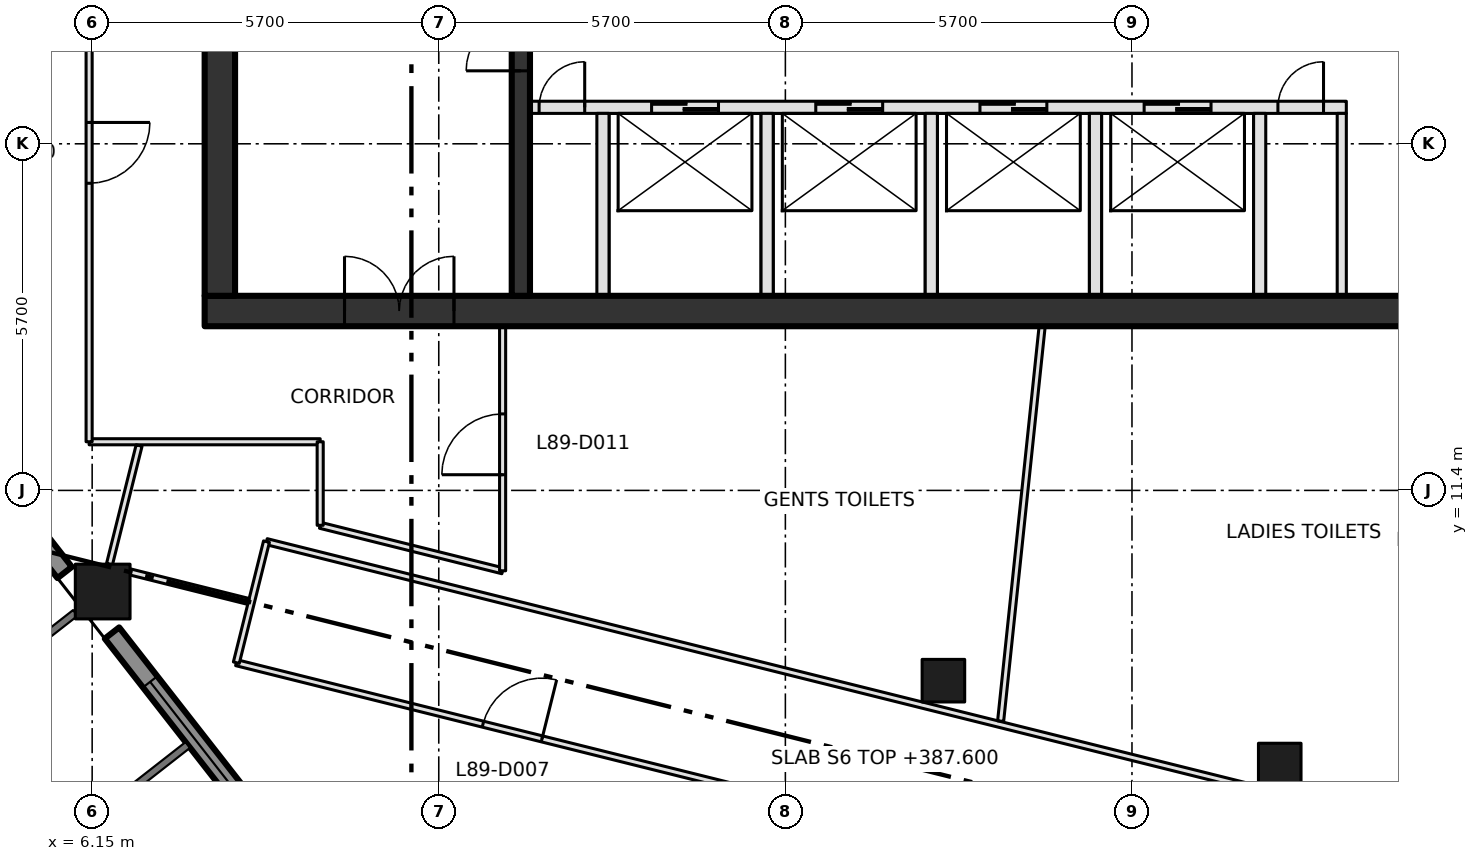
"""IFC4 building model, lengths in metres.
Left out: names, types, materials, properties, quantities, classifications, styles, units other than length and angle.
Written with IfcOpenShell. Run it as: python <this file> out.ifc"""

import sys

from ifc_helpers import new_model, si_unit, direction, frame, frame_2d, origin, origin_2d, place, context, subcontext, project, spatial, rectangle, extrude, element, fill, save


model = new_model("IFC4")
c1 = context("Model", 3, precision=1e-05, world=origin(), true_north=direction((0.0, 1.0)))
c2 = subcontext(c1, "Body", "Model", "MODEL_VIEW")
j1 = project(units=[si_unit("LENGTHUNIT", "METRE"), si_unit("PLANEANGLEUNIT", "RADIAN")], contexts=[c1])
p1 = place(None, origin())
s1 = spatial("IfcSite", under=j1, at=p1, CompositionType="ELEMENT")
p2 = place(p1, origin())
s2 = spatial("IfcBuilding", under=s1, at=p2, CompositionType="ELEMENT")
p3 = place(p2, frame((0.0, 0.0, 387.6)))
s3 = spatial("IfcBuildingStorey", under=s2, at=p3, CompositionType="ELEMENT", Elevation=387.6)
p4 = place(p3, frame((6.323, 9.737, 0.0), z_axis=(0.0, 0.0, 1.0), x_axis=(1.0, 0.0, 0.0)))
e1 = element("IfcColumn", 1, at=p4, inside=s3, PredefinedType="COLUMN", context=c2, shape_type="SweptSolid", body=[
    extrude(rectangle(XDim=0.9, YDim=0.9, at=origin_2d()), origin(), (0.0, 0.0, 1.0), 4.2),
])
for number, where, z_axis, x_axis in (
    (2, (20.149, 8.271, 0.0), (0.0, 0.0, 1.0), (1.0, 0.0, 0.0)),
    (3, (25.68, 6.892, 0.0), (0.0, 0.0, 1.0), (1.0, 0.0, 0.0)),
):
    element("IfcColumn", number, at=place(p3, frame(where, z_axis=z_axis, x_axis=x_axis)), inside=s3, PredefinedType="COLUMN", context=c2, shape_type="SweptSolid", body=[
        extrude(rectangle(XDim=0.7, YDim=0.7, at=origin_2d()), origin(), (0.0, 0.0, 1.0), 4.2),
    ])
p5 = place(p3, frame((8.0, 14.35, -0.3), z_axis=(0.0, 0.0, 1.0), x_axis=(1.0, 0.0, 0.0)))
e4 = element("IfcWall", 4, at=p5, inside=s3, PredefinedType="SHEAR", context=c2, shape_type="SweptSolid", body=[
    extrude(rectangle(XDim=22.8, YDim=0.5, at=frame_2d((11.4, 0.0))), origin(), (0.0, 0.0, 1.0), 4.2),
])
p6 = place(p5, frame((2.3, 0.0, 0.3)))
e5 = element("IfcOpeningElement", 5, at=p6, cuts=e4, PredefinedType="OPENING", context=c2, shape_type="SweptSolid", body=[
    extrude(rectangle(XDim=1.8, YDim=2.1, at=frame_2d((0.9, 1.05))), frame((0.0, 0.26, 0.0), z_axis=(0.0, -1.0, 0.0), x_axis=(1.0, 0.0, 0.0)), (0.0, 0.0, 1.0), 0.52),
])
p7 = place(p3, frame((8.25, 14.6, -0.3), z_axis=(0.0, 0.0, 1.0), x_axis=(0.0, 1.0, 0.0)))
e6 = element("IfcWall", 6, at=p7, inside=s3, PredefinedType="SHEAR", context=c2, shape_type="SweptSolid", body=[
    extrude(rectangle(XDim=21.1, YDim=0.5, at=frame_2d((10.55, 0.0))), origin(), (0.0, 0.0, 1.0), 4.2),
])
p8 = place(p3, frame((13.35, 17.7, 0.0), z_axis=(0.0, 0.0, 1.0), x_axis=(1.0, 0.0, 0.0)))
e7 = element("IfcWall", 7, at=p8, inside=s3, PredefinedType="SOLIDWALL", context=c2, shape_type="SweptSolid", body=[
    extrude(rectangle(XDim=13.425, YDim=0.2, at=frame_2d((6.712, 0.0))), origin(), (0.0, 0.0, 1.0), 3.9),
])
p9 = place(p8, frame((2.0, 0.0, 0.0)))
e8 = element("IfcOpeningElement", 8, at=p9, cuts=e7, PredefinedType="OPENING", context=c2, shape_type="SweptSolid", body=[
    extrude(rectangle(XDim=1.1, YDim=2.1, at=frame_2d((0.55, 1.05))), frame((0.0, 0.11, 0.0), z_axis=(0.0, -1.0, 0.0), x_axis=(1.0, 0.0, 0.0)), (0.0, 0.0, 1.0), 0.22),
])
p10 = place(p8, frame((4.7, 0.0, 0.0)))
e9 = element("IfcOpeningElement", 9, at=p10, cuts=e7, PredefinedType="OPENING", context=c2, shape_type="SweptSolid", body=[
    extrude(rectangle(XDim=1.1, YDim=2.1, at=frame_2d((0.55, 1.05))), frame((0.0, 0.11, 0.0), z_axis=(0.0, -1.0, 0.0), x_axis=(1.0, 0.0, 0.0)), (0.0, 0.0, 1.0), 0.22),
])
p11 = place(p8, frame((7.4, 0.0, 0.0)))
e10 = element("IfcOpeningElement", 10, at=p11, cuts=e7, PredefinedType="OPENING", context=c2, shape_type="SweptSolid", body=[
    extrude(rectangle(XDim=1.1, YDim=2.1, at=frame_2d((0.55, 1.05))), frame((0.0, 0.11, 0.0), z_axis=(0.0, -1.0, 0.0), x_axis=(1.0, 0.0, 0.0)), (0.0, 0.0, 1.0), 0.22),
])
p12 = place(p8, frame((10.1, 0.0, 0.0)))
e11 = element("IfcOpeningElement", 11, at=p12, cuts=e7, PredefinedType="OPENING", context=c2, shape_type="SweptSolid", body=[
    extrude(rectangle(XDim=1.1, YDim=2.1, at=frame_2d((0.55, 1.05))), frame((0.0, 0.11, 0.0), z_axis=(0.0, -1.0, 0.0), x_axis=(1.0, 0.0, 0.0)), (0.0, 0.0, 1.0), 0.22),
])
p13 = place(p8, frame((0.15, 0.0, 0.0)))
e12 = element("IfcOpeningElement", 12, at=p13, cuts=e7, PredefinedType="OPENING", context=c2, shape_type="SweptSolid", body=[
    extrude(rectangle(XDim=0.75, YDim=2.1, at=frame_2d((0.375, 1.05))), frame((0.0, 0.11, 0.0), z_axis=(0.0, -1.0, 0.0), x_axis=(1.0, 0.0, 0.0)), (0.0, 0.0, 1.0), 0.22),
])
p14 = place(p8, frame((12.3, 0.0, 0.0)))
e13 = element("IfcOpeningElement", 13, at=p14, cuts=e7, PredefinedType="OPENING", context=c2, shape_type="SweptSolid", body=[
    extrude(rectangle(XDim=0.75, YDim=2.1, at=frame_2d((0.375, 1.05))), frame((0.0, 0.11, 0.0), z_axis=(0.0, -1.0, 0.0), x_axis=(1.0, 0.0, 0.0)), (0.0, 0.0, 1.0), 0.22),
])
p15 = place(p3, frame((13.2, 14.6, 0.0), z_axis=(0.0, 0.0, 1.0), x_axis=(0.0, 1.0, 0.0)))
e14 = element("IfcWall", 14, at=p15, inside=s3, PredefinedType="SHEAR", context=c2, shape_type="SweptSolid", body=[
    extrude(rectangle(XDim=21.1, YDim=0.3, at=frame_2d((10.55, 0.0))), origin(), (0.0, 0.0, 1.0), 3.9),
])
p16 = place(p15, frame((3.7, 0.0, 0.0)))
e15 = element("IfcOpeningElement", 15, at=p16, cuts=e14, PredefinedType="OPENING", context=c2, shape_type="SweptSolid", body=[
    extrude(rectangle(XDim=1.8, YDim=2.1, at=frame_2d((0.9, 1.05))), frame((0.0, 0.16, 0.0), z_axis=(0.0, -1.0, 0.0), x_axis=(1.0, 0.0, 0.0)), (0.0, 0.0, 1.0), 0.32),
])
p17 = place(p15, frame((11.8, 0.0, 0.0)))
e16 = element("IfcOpeningElement", 16, at=p17, cuts=e14, PredefinedType="OPENING", context=c2, shape_type="SweptSolid", body=[
    extrude(rectangle(XDim=1.2, YDim=2.1, at=frame_2d((0.6, 1.05))), frame((0.0, 0.16, 0.0), z_axis=(0.0, -1.0, 0.0), x_axis=(1.0, 0.0, 0.0)), (0.0, 0.0, 1.0), 0.32),
])
for number, where, z_axis, x_axis in (
    (17, (14.55, 14.6, 0.0), (0.0, 0.0, 1.0), (0.0, 1.0, 0.0)),
    (18, (17.25, 14.6, 0.0), (0.0, 0.0, 1.0), (0.0, 1.0, 0.0)),
    (19, (19.95, 14.6, 0.0), (0.0, 0.0, 1.0), (0.0, 1.0, 0.0)),
    (20, (22.65, 14.6, 0.0), (0.0, 0.0, 1.0), (0.0, 1.0, 0.0)),
    (21, (25.35, 14.6, 0.0), (0.0, 0.0, 1.0), (0.0, 1.0, 0.0)),
):
    element("IfcWall", number, at=place(p3, frame(where, z_axis=z_axis, x_axis=x_axis)), inside=s3, PredefinedType="SOLIDWALL", context=c2, shape_type="SweptSolid", body=[
        extrude(rectangle(XDim=3.0, YDim=0.2, at=frame_2d((1.5, 0.0))), origin(), (0.0, 0.0, 1.0), 3.9),
    ])
p18 = place(p3, frame((26.7, 14.6, 0.0), z_axis=(0.0, 0.0, 1.0), x_axis=(0.0, 1.0, 0.0)))
e22 = element("IfcWall", 22, at=p18, inside=s3, PredefinedType="PARTITIONING", context=c2, shape_type="SweptSolid", body=[
    extrude(rectangle(XDim=3.0, YDim=0.15, at=frame_2d((1.5, 0.0))), origin(), (0.0, 0.0, 1.0), 3.9),
])
p19 = place(p3, frame((2.967, 13.547, 0.0), z_axis=(0.0, 0.0, 1.0), x_axis=(0.615486001463, -0.788147817356, 0.0)))
e23 = element("IfcWall", 23, at=p19, inside=s3, PredefinedType="SOLIDWALL", context=c2, shape_type="SweptSolid", body=[
    extrude(rectangle(XDim=4.437, YDim=0.3, at=frame_2d((2.219, 0.0))), origin(), (0.0, 0.0, 1.0), 3.2),
])
p20 = place(p19, frame((1.018, 0.0, 0.8)))
e24 = element("IfcOpeningElement", 24, at=p20, cuts=e23, PredefinedType="OPENING", context=c2, shape_type="SweptSolid", body=[
    extrude(rectangle(XDim=2.4, YDim=2.1, at=frame_2d((1.2, 1.05))), frame((0.0, 0.16, 0.0), z_axis=(0.0, -1.0, 0.0), x_axis=(1.0, 0.0, 0.0)), (0.0, 0.0, 1.0), 0.32),
])
p21 = place(p3, frame((6.476, 9.055, 0.0), z_axis=(0.0, 0.0, 1.0), x_axis=(0.615649380255, -0.788020203162, 0.0)))
e25 = element("IfcWall", 25, at=p21, inside=s3, PredefinedType="SOLIDWALL", context=c2, shape_type="SweptSolid", body=[
    extrude(rectangle(XDim=4.438, YDim=0.3, at=frame_2d((2.219, 0.0))), origin(), (0.0, 0.0, 1.0), 3.2),
])
p22 = place(p21, frame((1.019, 0.0, 0.8)))
e26 = element("IfcOpeningElement", 26, at=p22, cuts=e25, PredefinedType="OPENING", context=c2, shape_type="SweptSolid", body=[
    extrude(rectangle(XDim=2.4, YDim=2.1, at=frame_2d((1.2, 1.05))), frame((0.0, 0.16, 0.0), z_axis=(0.0, -1.0, 0.0), x_axis=(1.0, 0.0, 0.0)), (0.0, 0.0, 1.0), 0.32),
])
p23 = place(p3, frame((6.1, 12.2, 0.0), z_axis=(0.0, 0.0, 1.0), x_axis=(1.0, 0.0, 0.0)))
e27 = element("IfcWall", 27, at=p23, inside=s3, PredefinedType="PARTITIONING", context=c2, shape_type="SweptSolid", body=[
    extrude(rectangle(XDim=3.8, YDim=0.1, at=frame_2d((1.9, 0.0))), origin(), (0.0, 0.0, 1.0), 3.9),
])
p24 = place(p3, frame((6.1, 38.9, 0.0), z_axis=(0.0, 0.0, 1.0), x_axis=(0.0, -1.0, 0.0)))
e28 = element("IfcWall", 28, at=p24, inside=s3, PredefinedType="PARTITIONING", context=c2, shape_type="SweptSolid", body=[
    extrude(rectangle(XDim=26.7, YDim=0.1, at=frame_2d((13.35, 0.0))), origin(), (0.0, 0.0, 1.0), 3.9),
])
p25 = place(p24, frame((21.449, 0.0, 0.0)))
e29 = element("IfcOpeningElement", 29, at=p25, cuts=e28, PredefinedType="OPENING", context=c2, shape_type="SweptSolid", body=[
    extrude(rectangle(XDim=1.0, YDim=2.1, at=frame_2d((0.5, 1.05))), frame((0.0, 0.06, 0.0), z_axis=(0.0, -1.0, 0.0), x_axis=(1.0, 0.0, 0.0)), (0.0, 0.0, 1.0), 0.12),
])
p26 = place(p24, frame((13.049, 0.0, 0.0)))
e30 = element("IfcOpeningElement", 30, at=p26, cuts=e28, PredefinedType="OPENING", context=c2, shape_type="SweptSolid", body=[
    extrude(rectangle(XDim=1.0, YDim=2.1, at=frame_2d((0.5, 1.05))), frame((0.0, 0.06, 0.0), z_axis=(0.0, -1.0, 0.0), x_axis=(1.0, 0.0, 0.0)), (0.0, 0.0, 1.0), 0.12),
])
p27 = place(p24, frame((7.649, 0.0, 0.0)))
e31 = element("IfcOpeningElement", 31, at=p27, cuts=e28, PredefinedType="OPENING", context=c2, shape_type="SweptSolid", body=[
    extrude(rectangle(XDim=1.0, YDim=2.1, at=frame_2d((0.5, 1.05))), frame((0.0, 0.06, 0.0), z_axis=(0.0, -1.0, 0.0), x_axis=(1.0, 0.0, 0.0)), (0.0, 0.0, 1.0), 0.12),
])
p28 = place(p24, frame((2.08, 0.0, 0.0)))
e32 = element("IfcOpeningElement", 32, at=p28, cuts=e28, PredefinedType="OPENING", context=c2, shape_type="SweptSolid", body=[
    extrude(rectangle(XDim=1.0, YDim=2.1, at=frame_2d((0.5, 1.05))), frame((0.0, 0.06, 0.0), z_axis=(0.0, -1.0, 0.0), x_axis=(1.0, 0.0, 0.0)), (0.0, 0.0, 1.0), 0.12),
])
p29 = place(p3, frame((8.521, 8.567, 0.0), z_axis=(0.0, 0.0, 1.0), x_axis=(0.970301223092, -0.241899848006, 0.0)))
e33 = element("IfcWall", 33, at=p29, inside=s3, PredefinedType="PARTITIONING", context=c2, shape_type="SweptSolid", body=[
    extrude(rectangle(XDim=19.879, YDim=0.1, at=frame_2d((9.94, 0.0))), origin(), (0.0, 0.0, 1.0), 3.9),
])
p30 = place(p29, frame((13.707, 0.0, 0.0)))
e34 = element("IfcOpeningElement", 34, at=p30, cuts=e33, PredefinedType="OPENING", context=c2, shape_type="SweptSolid", body=[
    extrude(rectangle(XDim=1.8, YDim=2.1, at=frame_2d((0.9, 1.05))), frame((0.0, 0.06, 0.0), z_axis=(0.0, -1.0, 0.0), x_axis=(1.0, 0.0, 0.0)), (0.0, 0.0, 1.0), 0.12),
])
p31 = place(p29, frame((4.18, 0.0, 0.0)))
e35 = element("IfcOpeningElement", 35, at=p31, cuts=e33, PredefinedType="OPENING", context=c2, shape_type="SweptSolid", body=[
    extrude(rectangle(XDim=1.0, YDim=2.1, at=frame_2d((0.5, 1.05))), frame((0.0, 0.06, 0.0), z_axis=(0.0, -1.0, 0.0), x_axis=(1.0, 0.0, 0.0)), (0.0, 0.0, 1.0), 0.12),
])
p32 = place(p3, frame((9.017, 10.558, 0.0), z_axis=(0.0, 0.0, 1.0), x_axis=(0.970297621765, -0.241914293082, 0.0)))
e36 = element("IfcWall", 36, at=p32, inside=s3, PredefinedType="PARTITIONING", context=c2, shape_type="SweptSolid", body=[
    extrude(rectangle(XDim=19.879, YDim=0.1, at=frame_2d((9.94, 0.0))), origin(), (0.0, 0.0, 1.0), 3.9),
])
p33 = place(p3, frame((9.017, 10.558, 0.0), z_axis=(0.0, 0.0, 1.0), x_axis=(-0.241751728323, -0.970338137895, 0.0)))
e37 = element("IfcWall", 37, at=p33, inside=s3, PredefinedType="PARTITIONING", context=c2, shape_type="SweptSolid", body=[
    extrude(rectangle(XDim=2.052, YDim=0.1, at=frame_2d((1.026, 0.0))), origin(), (0.0, 0.0, 1.0), 3.9),
])
p34 = place(p3, frame((9.9, 10.826, 0.0), z_axis=(0.0, 0.0, 1.0), x_axis=(0.970290953223, -0.241941038466, 0.0)))
e38 = element("IfcWall", 38, at=p34, inside=s3, PredefinedType="PARTITIONING", context=c2, shape_type="SweptSolid", body=[
    extrude(rectangle(XDim=3.092, YDim=0.1, at=frame_2d((1.546, 0.0))), origin(), (0.0, 0.0, 1.0), 3.9),
])
p35 = place(p3, frame((9.9, 12.2, 0.0), z_axis=(0.0, 0.0, 1.0), x_axis=(0.0, -1.0, 0.0)))
e39 = element("IfcWall", 39, at=p35, inside=s3, PredefinedType="PARTITIONING", context=c2, shape_type="SweptSolid", body=[
    extrude(rectangle(XDim=1.374, YDim=0.1, at=frame_2d((0.687, 0.0))), origin(), (0.0, 0.0, 1.0), 3.9),
])
p36 = place(p3, frame((12.9, 10.078, 0.0), z_axis=(0.0, 0.0, 1.0), x_axis=(0.0, 1.0, 0.0)))
e40 = element("IfcWall", 40, at=p36, inside=s3, PredefinedType="PARTITIONING", context=c2, shape_type="SweptSolid", body=[
    extrude(rectangle(XDim=4.022, YDim=0.1, at=frame_2d((2.011, 0.0))), origin(), (0.0, 0.0, 1.0), 3.9),
])
p37 = place(p36, frame((1.58, 0.0, 0.0)))
e41 = element("IfcOpeningElement", 41, at=p37, cuts=e40, PredefinedType="OPENING", context=c2, shape_type="SweptSolid", body=[
    extrude(rectangle(XDim=1.0, YDim=2.1, at=frame_2d((0.5, 1.05))), frame((0.0, 0.06, 0.0), z_axis=(0.0, -1.0, 0.0), x_axis=(1.0, 0.0, 0.0)), (0.0, 0.0, 1.0), 0.12),
])
p38 = place(p3, frame((6.922, 12.138, 0.0), z_axis=(0.0, 0.0, 1.0), x_axis=(-0.24222136375, -0.97022101139, 0.0)))
e42 = element("IfcWall", 42, at=p38, inside=s3, PredefinedType="PARTITIONING", context=c2, shape_type="SweptSolid", body=[
    extrude(rectangle(XDim=2.011, YDim=0.1, at=frame_2d((1.005, 0.0))), origin(), (0.0, 0.0, 1.0), 3.9),
])
p39 = place(p3, frame((8.72, 9.574, 0.0), z_axis=(0.0, 0.0, 1.0), x_axis=(-0.970221168815, 0.24222073318, 0.0)))
e43 = element("IfcWall", 43, at=p39, inside=s3, PredefinedType="PARTITIONING", context=c2, shape_type="SweptSolid", body=[
    extrude(rectangle(XDim=2.007, YDim=0.1, at=frame_2d((1.003, 0.0))), origin(), (0.0, 0.0, 1.0), 3.9),
])
p40 = place(p3, frame((21.09, 7.606, 0.0), z_axis=(0.0, 0.0, 1.0), x_axis=(0.104573849471, 0.994517124039, 0.0)))
e44 = element("IfcWall", 44, at=p40, inside=s3, PredefinedType="PARTITIONING", context=c2, shape_type="SweptSolid", body=[
    extrude(rectangle(XDim=6.53, YDim=0.1, at=frame_2d((3.265, 0.0))), origin(), (0.0, 0.0, 1.0), 3.9),
])
p41 = place(p9, origin())
e45 = element("IfcDoor", 45, at=p41, inside=s3, OperationType="SLIDING_TO_LEFT", PredefinedType="DOOR", context=c2, shape_type="SweptSolid", body=[
    extrude(rectangle(XDim=1.1, YDim=2.1, at=frame_2d((0.55, 1.05))), frame((0.0, 0.025, 0.0), z_axis=(0.0, -1.0, 0.0), x_axis=(1.0, 0.0, 0.0)), (0.0, 0.0, 1.0), 0.05),
])
fill(e8, e45)
p42 = place(p10, origin())
e46 = element("IfcDoor", 46, at=p42, inside=s3, OperationType="SLIDING_TO_LEFT", PredefinedType="DOOR", context=c2, shape_type="SweptSolid", body=[
    extrude(rectangle(XDim=1.1, YDim=2.1, at=frame_2d((0.55, 1.05))), frame((0.0, 0.025, 0.0), z_axis=(0.0, -1.0, 0.0), x_axis=(1.0, 0.0, 0.0)), (0.0, 0.0, 1.0), 0.05),
])
fill(e9, e46)
p43 = place(p11, origin())
e47 = element("IfcDoor", 47, at=p43, inside=s3, OperationType="SLIDING_TO_LEFT", PredefinedType="DOOR", context=c2, shape_type="SweptSolid", body=[
    extrude(rectangle(XDim=1.1, YDim=2.1, at=frame_2d((0.55, 1.05))), frame((0.0, 0.025, 0.0), z_axis=(0.0, -1.0, 0.0), x_axis=(1.0, 0.0, 0.0)), (0.0, 0.0, 1.0), 0.05),
])
fill(e10, e47)
p44 = place(p12, origin())
e48 = element("IfcDoor", 48, at=p44, inside=s3, OperationType="SLIDING_TO_LEFT", PredefinedType="DOOR", context=c2, shape_type="SweptSolid", body=[
    extrude(rectangle(XDim=1.1, YDim=2.1, at=frame_2d((0.55, 1.05))), frame((0.0, 0.025, 0.0), z_axis=(0.0, -1.0, 0.0), x_axis=(1.0, 0.0, 0.0)), (0.0, 0.0, 1.0), 0.05),
])
fill(e11, e48)
p45 = place(p13, origin())
e49 = element("IfcDoor", 49, at=p45, inside=s3, OperationType="SINGLE_SWING_RIGHT", PredefinedType="DOOR", context=c2, shape_type="SweptSolid", body=[
    extrude(rectangle(XDim=0.75, YDim=2.1, at=frame_2d((0.375, 1.05))), frame((0.0, 0.025, 0.0), z_axis=(0.0, -1.0, 0.0), x_axis=(1.0, 0.0, 0.0)), (0.0, 0.0, 1.0), 0.05),
])
fill(e12, e49)
p46 = place(p14, origin())
e50 = element("IfcDoor", 50, at=p46, inside=s3, OperationType="SINGLE_SWING_RIGHT", PredefinedType="DOOR", context=c2, shape_type="SweptSolid", body=[
    extrude(rectangle(XDim=0.75, YDim=2.1, at=frame_2d((0.375, 1.05))), frame((0.0, 0.025, 0.0), z_axis=(0.0, -1.0, 0.0), x_axis=(1.0, 0.0, 0.0)), (0.0, 0.0, 1.0), 0.05),
])
fill(e13, e50)
p47 = place(p16, origin())
e51 = element("IfcDoor", 51, at=p47, inside=s3, OperationType="DOUBLE_DOOR_SINGLE_SWING", PredefinedType="DOOR", context=c2, shape_type="SweptSolid", body=[
    extrude(rectangle(XDim=1.8, YDim=2.1, at=frame_2d((0.9, 1.05))), frame((0.0, 0.025, 0.0), z_axis=(0.0, -1.0, 0.0), x_axis=(1.0, 0.0, 0.0)), (0.0, 0.0, 1.0), 0.05),
])
fill(e15, e51)
p48 = place(p6, origin())
e52 = element("IfcDoor", 52, at=p48, inside=s3, OperationType="DOUBLE_DOOR_SINGLE_SWING", PredefinedType="DOOR", context=c2, shape_type="SweptSolid", body=[
    extrude(rectangle(XDim=1.8, YDim=2.1, at=frame_2d((0.9, 1.05))), frame((0.0, 0.025, 0.0), z_axis=(0.0, -1.0, 0.0), x_axis=(1.0, 0.0, 0.0)), (0.0, 0.0, 1.0), 0.05),
])
fill(e5, e52)
p49 = place(p22, origin())
e53 = element("IfcWindow", 53, at=p49, inside=s3, PartitioningType="DOUBLE_PANEL_VERTICAL", PredefinedType="WINDOW", context=c2, shape_type="SweptSolid", body=[
    extrude(rectangle(XDim=2.4, YDim=2.1, at=frame_2d((1.2, 1.05))), frame((0.0, 0.03, 0.0), z_axis=(0.0, -1.0, 0.0), x_axis=(1.0, 0.0, 0.0)), (0.0, 0.0, 1.0), 0.06),
])
fill(e26, e53)
p50 = place(p31, origin())
e54 = element("IfcDoor", 54, at=p50, inside=s3, OperationType="SINGLE_SWING_RIGHT", PredefinedType="DOOR", context=c2, shape_type="SweptSolid", body=[
    extrude(rectangle(XDim=1.0, YDim=2.1, at=frame_2d((0.5, 1.05))), frame((0.0, 0.025, 0.0), z_axis=(0.0, -1.0, 0.0), x_axis=(1.0, 0.0, 0.0)), (0.0, 0.0, 1.0), 0.05),
])
fill(e35, e54)
p51 = place(p25, origin())
e55 = element("IfcDoor", 55, at=p51, inside=s3, OperationType="SINGLE_SWING_LEFT", PredefinedType="DOOR", context=c2, shape_type="SweptSolid", body=[
    extrude(rectangle(XDim=1.0, YDim=2.1, at=frame_2d((0.5, 1.05))), frame((0.0, 0.025, 0.0), z_axis=(0.0, -1.0, 0.0), x_axis=(1.0, 0.0, 0.0)), (0.0, 0.0, 1.0), 0.05),
])
fill(e29, e55)
p52 = place(p37, origin())
e56 = element("IfcDoor", 56, at=p52, inside=s3, OperationType="SINGLE_SWING_LEFT", PredefinedType="DOOR", context=c2, shape_type="SweptSolid", body=[
    extrude(rectangle(XDim=1.0, YDim=2.1, at=frame_2d((0.5, 1.05))), frame((0.0, 0.025, 0.0), z_axis=(0.0, -1.0, 0.0), x_axis=(1.0, 0.0, 0.0)), (0.0, 0.0, 1.0), 0.05),
])
fill(e41, e56)
save(model, sys.argv[1])
